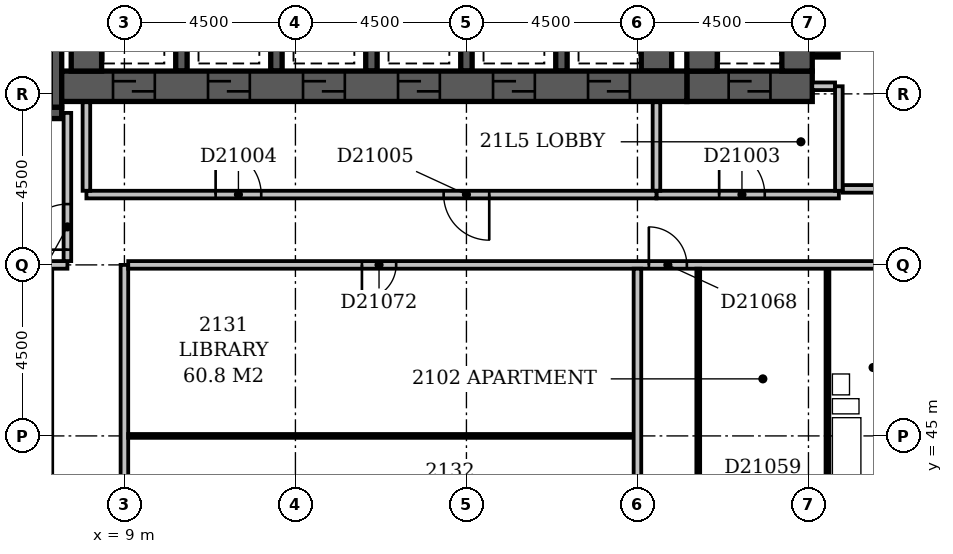
"""IFC4 building model, lengths in metres.
Left out: names, types, materials, properties, quantities, classifications, styles, units other than length and angle.
Written with IfcOpenShell. Run it as: python <this file> out.ifc"""

import sys

from ifc_helpers import new_model, si_unit, direction, frame, frame_2d, origin, place, context, subcontext, project, spatial, rectangle, extrude, element, fill, save


model = new_model("IFC4")
c1 = context("Model", 3, precision=1e-05, world=origin(), true_north=direction((0.0, 1.0)))
c2 = subcontext(c1, "Body", "Model", "MODEL_VIEW")
j1 = project(units=[si_unit("LENGTHUNIT", "METRE"), si_unit("PLANEANGLEUNIT", "RADIAN")], contexts=[c1])
p1 = place(None, origin())
s1 = spatial("IfcSite", under=j1, at=p1, CompositionType="ELEMENT")
p2 = place(p1, origin())
s2 = spatial("IfcBuilding", under=s1, at=p2, CompositionType="ELEMENT")
p3 = place(p2, frame((0.0, 0.0, 86.6)))
s3 = spatial("IfcBuildingStorey", under=s2, at=p3, CompositionType="ELEMENT", Elevation=86.6)
p4 = place(p3, frame((0.35, 53.5, -0.3), z_axis=(0.0, 0.0, 1.0), x_axis=(1.0, 0.0, 0.0)))
e1 = element("IfcWall", 1, at=p4, inside=s3, PredefinedType="SHEAR", context=c2, shape_type="SweptSolid", body=[
    extrude(rectangle(XDim=7.0, YDim=0.3, at=frame_2d((3.5, 0.0))), origin(), (0.0, 0.0, 1.0), 3.6),
])
p5 = place(p4, frame((5.58, 0.0, 0.3)))
e2 = element("IfcOpeningElement", 2, at=p5, cuts=e1, PredefinedType="OPENING", context=c2, shape_type="SweptSolid", body=[
    extrude(rectangle(XDim=1.1, YDim=2.1, at=frame_2d((0.55, 1.05))), frame((0.0, 0.162, 0.0), z_axis=(0.0, -1.0, 0.0), x_axis=(1.0, 0.0, 0.0)), (0.0, 0.0, 1.0), 0.324),
])
p6 = place(p3, frame((7.2, 53.65, -0.3), z_axis=(0.0, 0.0, 1.0), x_axis=(0.0, 1.0, 0.0)))
e3 = element("IfcWall", 3, at=p6, inside=s3, PredefinedType="SHEAR", context=c2, shape_type="SweptSolid", body=[
    extrude(rectangle(XDim=4.2, YDim=0.3, at=frame_2d((2.1, 0.0))), origin(), (0.0, 0.0, 1.0), 3.6),
])
p7 = place(p3, frame((7.35, 54.2, -0.3), z_axis=(0.0, 0.0, 1.0), x_axis=(1.0, 0.0, 0.0)))
e4 = element("IfcWall", 4, at=p7, inside=s3, PredefinedType="SHEAR", context=c2, shape_type="SweptSolid", body=[
    extrude(rectangle(XDim=16.45, YDim=0.8, at=frame_2d((8.225, 0.0))), origin(), (0.0, 0.0, 1.0), 3.6),
])
p8 = place(p7, frame((1.35, 0.0, 0.3)))
e5 = element("IfcOpeningElement", 5, at=p8, cuts=e4, PredefinedType="OPENING", context=c2, shape_type="SweptSolid", body=[
    extrude(rectangle(XDim=1.1, YDim=2.1, at=frame_2d((0.55, 1.05))), frame((0.0, 0.412, 0.0), z_axis=(0.0, -1.0, 0.0), x_axis=(1.0, 0.0, 0.0)), (0.0, 0.0, 1.0), 0.824),
])
p9 = place(p7, frame((3.85, 0.0, 0.3)))
e6 = element("IfcOpeningElement", 6, at=p9, cuts=e4, PredefinedType="OPENING", context=c2, shape_type="SweptSolid", body=[
    extrude(rectangle(XDim=1.1, YDim=2.1, at=frame_2d((0.55, 1.05))), frame((0.0, 0.412, 0.0), z_axis=(0.0, -1.0, 0.0), x_axis=(1.0, 0.0, 0.0)), (0.0, 0.0, 1.0), 0.824),
])
p10 = place(p7, frame((6.35, 0.0, 0.3)))
e7 = element("IfcOpeningElement", 7, at=p10, cuts=e4, PredefinedType="OPENING", context=c2, shape_type="SweptSolid", body=[
    extrude(rectangle(XDim=1.1, YDim=2.1, at=frame_2d((0.55, 1.05))), frame((0.0, 0.412, 0.0), z_axis=(0.0, -1.0, 0.0), x_axis=(1.0, 0.0, 0.0)), (0.0, 0.0, 1.0), 0.824),
])
p11 = place(p7, frame((8.85, 0.0, 0.3)))
e8 = element("IfcOpeningElement", 8, at=p11, cuts=e4, PredefinedType="OPENING", context=c2, shape_type="SweptSolid", body=[
    extrude(rectangle(XDim=1.1, YDim=2.1, at=frame_2d((0.55, 1.05))), frame((0.0, 0.412, 0.0), z_axis=(0.0, -1.0, 0.0), x_axis=(1.0, 0.0, 0.0)), (0.0, 0.0, 1.0), 0.824),
])
p12 = place(p7, frame((11.35, 0.0, 0.3)))
e9 = element("IfcOpeningElement", 9, at=p12, cuts=e4, PredefinedType="OPENING", context=c2, shape_type="SweptSolid", body=[
    extrude(rectangle(XDim=1.1, YDim=2.1, at=frame_2d((0.55, 1.05))), frame((0.0, 0.412, 0.0), z_axis=(0.0, -1.0, 0.0), x_axis=(1.0, 0.0, 0.0)), (0.0, 0.0, 1.0), 0.824),
])
p13 = place(p7, frame((13.85, 0.0, 0.3)))
e10 = element("IfcOpeningElement", 10, at=p13, cuts=e4, PredefinedType="OPENING", context=c2, shape_type="SweptSolid", body=[
    extrude(rectangle(XDim=1.1, YDim=2.1, at=frame_2d((0.55, 1.05))), frame((0.0, 0.412, 0.0), z_axis=(0.0, -1.0, 0.0), x_axis=(1.0, 0.0, 0.0)), (0.0, 0.0, 1.0), 0.824),
])
p14 = place(p3, frame((8.0, 54.6, -0.3), z_axis=(0.0, 0.0, 1.0), x_axis=(0.0, 1.0, 0.0)))
e11 = element("IfcWall", 11, at=p14, inside=s3, PredefinedType="SHEAR", context=c2, shape_type="SweptSolid", body=[
    extrude(rectangle(XDim=3.0, YDim=0.8, at=frame_2d((1.5, 0.0))), origin(), (0.0, 0.0, 1.0), 3.6),
])
for number, where, z_axis, x_axis in (
    (12, (10.5, 54.6, -0.3), (0.0, 0.0, 1.0), (0.0, 1.0, 0.0)),
    (13, (13.0, 54.6, -0.3), (0.0, 0.0, 1.0), (0.0, 1.0, 0.0)),
    (14, (15.5, 54.6, -0.3), (0.0, 0.0, 1.0), (0.0, 1.0, 0.0)),
    (15, (18.0, 54.6, -0.3), (0.0, 0.0, 1.0), (0.0, 1.0, 0.0)),
    (16, (20.5, 54.6, -0.3), (0.0, 0.0, 1.0), (0.0, 1.0, 0.0)),
):
    element("IfcWall", number, at=place(p3, frame(where, z_axis=z_axis, x_axis=x_axis)), inside=s3, PredefinedType="SHEAR", context=c2, shape_type="SweptSolid", body=[
        extrude(rectangle(XDim=3.0, YDim=0.3, at=frame_2d((1.5, 0.0))), origin(), (0.0, 0.0, 1.0), 3.6),
    ])
p15 = place(p3, frame((23.0, 54.6, -0.3), z_axis=(0.0, 0.0, 1.0), x_axis=(0.0, 1.0, 0.0)))
e17 = element("IfcWall", 17, at=p15, inside=s3, PredefinedType="SHEAR", context=c2, shape_type="SweptSolid", body=[
    extrude(rectangle(XDim=3.0, YDim=0.8, at=frame_2d((1.5, 0.0))), origin(), (0.0, 0.0, 1.0), 3.6),
])
p16 = place(p3, frame((23.8, 54.2, -0.3), z_axis=(0.0, 0.0, 1.0), x_axis=(1.0, 0.0, 0.0)))
e18 = element("IfcWall", 18, at=p16, inside=s3, PredefinedType="SHEAR", context=c2, shape_type="SweptSolid", body=[
    extrude(rectangle(XDim=3.3, YDim=0.8, at=frame_2d((1.65, 0.0))), origin(), (0.0, 0.0, 1.0), 3.6),
])
p17 = place(p16, frame((1.1, 0.0, 0.3)))
e19 = element("IfcOpeningElement", 19, at=p17, cuts=e18, PredefinedType="OPENING", context=c2, shape_type="SweptSolid", body=[
    extrude(rectangle(XDim=1.1, YDim=2.1, at=frame_2d((0.55, 1.05))), frame((0.0, 0.412, 0.0), z_axis=(0.0, -1.0, 0.0), x_axis=(1.0, 0.0, 0.0)), (0.0, 0.0, 1.0), 0.824),
])
for number, where, z_axis, x_axis in (
    (20, (24.2, 54.6, -0.3), (0.0, 0.0, 1.0), (0.0, 1.0, 0.0)),
    (21, (26.7, 54.6, -0.3), (0.0, 0.0, 1.0), (0.0, 1.0, 0.0)),
):
    element("IfcWall", number, at=place(p3, frame(where, z_axis=z_axis, x_axis=x_axis)), inside=s3, PredefinedType="SHEAR", context=c2, shape_type="SweptSolid", body=[
        extrude(rectangle(XDim=3.0, YDim=0.8, at=frame_2d((1.5, 0.0))), origin(), (0.0, 0.0, 1.0), 3.6),
    ])
p18 = place(p3, frame((8.0, 51.35, 0.0), z_axis=(0.0, 0.0, 1.0), x_axis=(1.0, 0.0, 0.0)))
e22 = element("IfcWall", 22, at=p18, inside=s3, PredefinedType="PARTITIONING", context=c2, shape_type="SweptSolid", body=[
    extrude(rectangle(XDim=15.0, YDim=0.2, at=frame_2d((7.5, 0.0))), origin(), (0.0, 0.0, 1.0), 3.3),
])
p19 = place(p18, frame((3.4, 0.0, 0.0)))
e23 = element("IfcOpeningElement", 23, at=p19, cuts=e22, PredefinedType="OPENING", context=c2, shape_type="SweptSolid", body=[
    extrude(rectangle(XDim=1.2, YDim=2.1, at=frame_2d((0.6, 1.05))), frame((0.0, 0.112, 0.0), z_axis=(0.0, -1.0, 0.0), x_axis=(1.0, 0.0, 0.0)), (0.0, 0.0, 1.0), 0.224),
])
p20 = place(p18, frame((9.4, 0.0, 0.0)))
e24 = element("IfcOpeningElement", 24, at=p20, cuts=e22, PredefinedType="OPENING", context=c2, shape_type="SweptSolid", body=[
    extrude(rectangle(XDim=1.2, YDim=2.1, at=frame_2d((0.6, 1.05))), frame((0.0, 0.112, 0.0), z_axis=(0.0, -1.0, 0.0), x_axis=(1.0, 0.0, 0.0)), (0.0, 0.0, 1.0), 0.224),
])
for number, where, z_axis, x_axis in (
    (25, (23.0, 51.45, 0.0), (0.0, 0.0, 1.0), (0.0, 1.0, 0.0)),
    (26, (8.0, 51.45, 0.0), (0.0, 0.0, 1.0), (0.0, 1.0, 0.0)),
):
    element("IfcWall", number, at=place(p3, frame(where, z_axis=z_axis, x_axis=x_axis)), inside=s3, PredefinedType="PARTITIONING", context=c2, shape_type="SweptSolid", body=[
        extrude(rectangle(XDim=2.33, YDim=0.2, at=frame_2d((1.165, 0.0))), origin(), (0.0, 0.0, 1.0), 3.3),
    ])
p21 = place(p3, frame((23.0, 51.35, 0.0), z_axis=(0.0, 0.0, 1.0), x_axis=(1.0, 0.0, 0.0)))
e27 = element("IfcWall", 27, at=p21, inside=s3, PredefinedType="PARTITIONING", context=c2, shape_type="SweptSolid", body=[
    extrude(rectangle(XDim=4.8, YDim=0.2, at=frame_2d((2.4, 0.0))), origin(), (0.0, 0.0, 1.0), 3.3),
])
p22 = place(p21, frame((1.65, 0.0, 0.0)))
e28 = element("IfcOpeningElement", 28, at=p22, cuts=e27, PredefinedType="OPENING", context=c2, shape_type="SweptSolid", body=[
    extrude(rectangle(XDim=1.2, YDim=2.1, at=frame_2d((0.6, 1.05))), frame((0.0, 0.112, 0.0), z_axis=(0.0, -1.0, 0.0), x_axis=(1.0, 0.0, 0.0)), (0.0, 0.0, 1.0), 0.224),
])
p23 = place(p3, frame((27.8, 51.45, 0.0), z_axis=(0.0, 0.0, 1.0), x_axis=(0.0, 1.0, 0.0)))
e29 = element("IfcWall", 29, at=p23, inside=s3, PredefinedType="PARTITIONING", context=c2, shape_type="SweptSolid", body=[
    extrude(rectangle(XDim=2.75, YDim=0.2, at=frame_2d((1.375, 0.0))), origin(), (0.0, 0.0, 1.0), 3.3),
])
p24 = place(p3, frame((27.1, 54.2, 0.0), z_axis=(0.0, 0.0, 1.0), x_axis=(1.0, 0.0, 0.0)))
e30 = element("IfcWall", 30, at=p24, inside=s3, PredefinedType="PARTITIONING", context=c2, shape_type="SweptSolid", body=[
    extrude(rectangle(XDim=0.6, YDim=0.2, at=frame_2d((0.3, 0.0))), origin(), (0.0, 0.0, 1.0), 3.3),
])
p25 = place(p3, frame((0.5, 49.5, 0.0), z_axis=(0.0, 0.0, 1.0), x_axis=(1.0, 0.0, 0.0)))
e31 = element("IfcWall", 31, at=p25, inside=s3, PredefinedType="PARTITIONING", context=c2, shape_type="SweptSolid", body=[
    extrude(rectangle(XDim=7.0, YDim=0.2, at=frame_2d((3.5, 0.0))), origin(), (0.0, 0.0, 1.0), 3.3),
])
p26 = place(p3, frame((7.5, 49.6, 0.0), z_axis=(0.0, 0.0, 1.0), x_axis=(0.0, 1.0, 0.0)))
e32 = element("IfcWall", 32, at=p26, inside=s3, PredefinedType="PARTITIONING", context=c2, shape_type="SweptSolid", body=[
    extrude(rectangle(XDim=3.9, YDim=0.2, at=frame_2d((1.95, 0.0))), origin(), (0.0, 0.0, 1.0), 3.3),
])
p27 = place(p26, frame((0.3, 0.0, 0.0)))
e33 = element("IfcOpeningElement", 33, at=p27, cuts=e32, PredefinedType="OPENING", context=c2, shape_type="SweptSolid", body=[
    extrude(rectangle(XDim=1.2, YDim=2.1, at=frame_2d((0.6, 1.05))), frame((0.0, 0.112, 0.0), z_axis=(0.0, -1.0, 0.0), x_axis=(1.0, 0.0, 0.0)), (0.0, 0.0, 1.0), 0.224),
])
p28 = place(p3, frame((9.0, 5.0, 0.0), z_axis=(0.0, 0.0, 1.0), x_axis=(0.0, 1.0, 0.0)))
e34 = element("IfcWall", 34, at=p28, inside=s3, PredefinedType="PARTITIONING", context=c2, shape_type="SweptSolid", body=[
    extrude(rectangle(XDim=44.5, YDim=0.2, at=frame_2d((22.25, 0.0))), origin(), (0.0, 0.0, 1.0), 3.3),
])
p29 = place(p28, frame((28.45, 0.0, 0.0)))
e35 = element("IfcOpeningElement", 35, at=p29, cuts=e34, PredefinedType="OPENING", context=c2, shape_type="SweptSolid", body=[
    extrude(rectangle(XDim=1.0, YDim=2.1, at=frame_2d((0.5, 1.05))), frame((0.0, 0.112, 0.0), z_axis=(0.0, -1.0, 0.0), x_axis=(1.0, 0.0, 0.0)), (0.0, 0.0, 1.0), 0.224),
])
p30 = place(p28, frame((22.8, 0.0, 0.0)))
e36 = element("IfcOpeningElement", 36, at=p30, cuts=e34, PredefinedType="OPENING", context=c2, shape_type="SweptSolid", body=[
    extrude(rectangle(XDim=1.0, YDim=2.1, at=frame_2d((0.5, 1.05))), frame((0.0, 0.112, 0.0), z_axis=(0.0, -1.0, 0.0), x_axis=(1.0, 0.0, 0.0)), (0.0, 0.0, 1.0), 0.224),
])
p31 = place(p28, frame((14.55, 0.0, 0.0)))
e37 = element("IfcOpeningElement", 37, at=p31, cuts=e34, PredefinedType="OPENING", context=c2, shape_type="SweptSolid", body=[
    extrude(rectangle(XDim=1.0, YDim=2.1, at=frame_2d((0.5, 1.05))), frame((0.0, 0.112, 0.0), z_axis=(0.0, -1.0, 0.0), x_axis=(1.0, 0.0, 0.0)), (0.0, 0.0, 1.0), 0.224),
])
p32 = place(p28, frame((9.3, 0.0, 0.0)))
e38 = element("IfcOpeningElement", 38, at=p32, cuts=e34, PredefinedType="OPENING", context=c2, shape_type="SweptSolid", body=[
    extrude(rectangle(XDim=1.0, YDim=2.1, at=frame_2d((0.5, 1.05))), frame((0.0, 0.112, 0.0), z_axis=(0.0, -1.0, 0.0), x_axis=(1.0, 0.0, 0.0)), (0.0, 0.0, 1.0), 0.224),
])
p33 = place(p28, frame((35.0, 0.0, 0.0)))
e39 = element("IfcOpeningElement", 39, at=p33, cuts=e34, PredefinedType="OPENING", context=c2, shape_type="SweptSolid", body=[
    extrude(rectangle(XDim=0.9, YDim=2.1, at=frame_2d((0.45, 1.05))), frame((0.0, 0.112, 0.0), z_axis=(0.0, -1.0, 0.0), x_axis=(1.0, 0.0, 0.0)), (0.0, 0.0, 1.0), 0.224),
])
p34 = place(p28, frame((1.5, 0.0, 0.0)))
e40 = element("IfcOpeningElement", 40, at=p34, cuts=e34, PredefinedType="OPENING", context=c2, shape_type="SweptSolid", body=[
    extrude(rectangle(XDim=0.9, YDim=2.1, at=frame_2d((0.45, 1.05))), frame((0.0, 0.112, 0.0), z_axis=(0.0, -1.0, 0.0), x_axis=(1.0, 0.0, 0.0)), (0.0, 0.0, 1.0), 0.224),
])
p35 = place(p3, frame((22.5, 36.6, 0.0), z_axis=(0.0, 0.0, 1.0), x_axis=(0.0, 1.0, 0.0)))
e41 = element("IfcWall", 41, at=p35, inside=s3, PredefinedType="PARTITIONING", context=c2, shape_type="SweptSolid", body=[
    extrude(rectangle(XDim=12.8, YDim=0.2, at=frame_2d((6.4, 0.0))), origin(), (0.0, 0.0, 1.0), 3.3),
])
p36 = place(p3, frame((24.1, 43.15, 0.0), z_axis=(0.0, 0.0, 1.0), x_axis=(0.0, 1.0, 0.0)))
e42 = element("IfcWall", 42, at=p36, inside=s3, PredefinedType="PARTITIONING", context=c2, shape_type="SweptSolid", body=[
    extrude(rectangle(XDim=6.25, YDim=0.1, at=frame_2d((3.125, 0.0))), origin(), (0.0, 0.0, 1.0), 3.3),
])
p37 = place(p3, frame((27.5, 43.2, 0.0), z_axis=(0.0, 0.0, 1.0), x_axis=(0.0, 1.0, 0.0)))
e43 = element("IfcWall", 43, at=p37, inside=s3, PredefinedType="PLUMBINGWALL", context=c2, shape_type="SweptSolid", body=[
    extrude(rectangle(XDim=6.2, YDim=0.1, at=frame_2d((3.1, 0.0))), origin(), (0.0, 0.0, 1.0), 2.6),
])
p38 = place(p3, frame((9.1, 45.0, 0.0), z_axis=(0.0, 0.0, 1.0), x_axis=(1.0, 0.0, 0.0)))
e44 = element("IfcWall", 44, at=p38, inside=s3, PredefinedType="PARTITIONING", context=c2, shape_type="SweptSolid", body=[
    extrude(rectangle(XDim=13.3, YDim=0.1, at=frame_2d((6.65, 0.0))), origin(), (0.0, 0.0, 1.0), 3.3),
])
p39 = place(p3, frame((9.1, 49.5, 0.0), z_axis=(0.0, 0.0, 1.0), x_axis=(1.0, 0.0, 0.0)))
e45 = element("IfcWall", 45, at=p39, inside=s3, PredefinedType="PARTITIONING", context=c2, shape_type="SweptSolid", body=[
    extrude(rectangle(XDim=57.8, YDim=0.2, at=frame_2d((28.9, 0.0))), origin(), (0.0, 0.0, 1.0), 3.3),
])
p40 = place(p39, frame((13.7, 0.0, 0.0)))
e46 = element("IfcOpeningElement", 46, at=p40, cuts=e45, PredefinedType="OPENING", context=c2, shape_type="SweptSolid", body=[
    extrude(rectangle(XDim=1.0, YDim=2.1, at=frame_2d((0.5, 1.05))), frame((0.0, 0.112, 0.0), z_axis=(0.0, -1.0, 0.0), x_axis=(1.0, 0.0, 0.0)), (0.0, 0.0, 1.0), 0.224),
])
p41 = place(p39, frame((22.7, 0.0, 0.0)))
e47 = element("IfcOpeningElement", 47, at=p41, cuts=e45, PredefinedType="OPENING", context=c2, shape_type="SweptSolid", body=[
    extrude(rectangle(XDim=1.0, YDim=2.1, at=frame_2d((0.5, 1.05))), frame((0.0, 0.112, 0.0), z_axis=(0.0, -1.0, 0.0), x_axis=(1.0, 0.0, 0.0)), (0.0, 0.0, 1.0), 0.224),
])
p42 = place(p39, frame((38.6, 0.0, 0.0)))
e48 = element("IfcOpeningElement", 48, at=p42, cuts=e45, PredefinedType="OPENING", context=c2, shape_type="SweptSolid", body=[
    extrude(rectangle(XDim=1.0, YDim=2.1, at=frame_2d((0.5, 1.05))), frame((0.0, 0.112, 0.0), z_axis=(0.0, -1.0, 0.0), x_axis=(1.0, 0.0, 0.0)), (0.0, 0.0, 1.0), 0.224),
])
p43 = place(p39, frame((55.45, 0.0, 0.0)))
e49 = element("IfcOpeningElement", 49, at=p43, cuts=e45, PredefinedType="OPENING", context=c2, shape_type="SweptSolid", body=[
    extrude(rectangle(XDim=1.0, YDim=2.1, at=frame_2d((0.5, 1.05))), frame((0.0, 0.112, 0.0), z_axis=(0.0, -1.0, 0.0), x_axis=(1.0, 0.0, 0.0)), (0.0, 0.0, 1.0), 0.224),
])
p44 = place(p39, frame((6.15, 0.0, 0.0)))
e50 = element("IfcOpeningElement", 50, at=p44, cuts=e45, PredefinedType="OPENING", context=c2, shape_type="SweptSolid", body=[
    extrude(rectangle(XDim=0.9, YDim=2.1, at=frame_2d((0.45, 1.05))), frame((0.0, 0.112, 0.0), z_axis=(0.0, -1.0, 0.0), x_axis=(1.0, 0.0, 0.0)), (0.0, 0.0, 1.0), 0.224),
])
p45 = place(p3, frame((27.9, 51.5, 0.0), z_axis=(0.0, 0.0, 1.0), x_axis=(1.0, 0.0, 0.0)))
e51 = element("IfcWall", 51, at=p45, inside=s3, PredefinedType="PARTITIONING", context=c2, shape_type="SweptSolid", body=[
    extrude(rectangle(XDim=9.3, YDim=0.2, at=frame_2d((4.65, 0.0))), origin(), (0.0, 0.0, 1.0), 3.3),
])
p46 = place(p45, frame((4.2, 0.0, 0.0)))
e52 = element("IfcOpeningElement", 52, at=p46, cuts=e51, PredefinedType="OPENING", context=c2, shape_type="SweptSolid", body=[
    extrude(rectangle(XDim=0.9, YDim=2.1, at=frame_2d((0.45, 1.05))), frame((0.0, 0.112, 0.0), z_axis=(0.0, -1.0, 0.0), x_axis=(1.0, 0.0, 0.0)), (0.0, 0.0, 1.0), 0.224),
])
p47 = place(p3, frame((27.1, 55.0, 0.0), z_axis=(0.0, 0.0, 1.0), x_axis=(1.0, 0.0, 0.0)))
e53 = element("IfcWall", 53, at=p47, inside=s3, PredefinedType="PARTITIONING", context=c2, shape_type="SweptSolid", body=[
    extrude(rectangle(XDim=0.7, YDim=0.1, at=frame_2d((0.35, 0.0))), origin(), (0.0, 0.0, 1.0), 3.3),
])
p48 = place(p27, origin())
e54 = element("IfcDoor", 54, at=p48, inside=s3, OperationType="SINGLE_SWING_LEFT", PredefinedType="DOOR", context=c2, shape_type="SweptSolid", body=[
    extrude(rectangle(XDim=1.2, YDim=2.1, at=frame_2d((0.6, 1.05))), frame((0.0, 0.025, 0.0), z_axis=(0.0, -1.0, 0.0), x_axis=(1.0, 0.0, 0.0)), (0.0, 0.0, 1.0), 0.05),
])
fill(e33, e54)
p49 = place(p22, origin())
e55 = element("IfcDoor", 55, at=p49, inside=s3, OperationType="SINGLE_SWING_LEFT", PredefinedType="DOOR", context=c2, shape_type="SweptSolid", body=[
    extrude(rectangle(XDim=1.2, YDim=2.1, at=frame_2d((0.6, 1.05))), frame((0.0, 0.025, 0.0), z_axis=(0.0, -1.0, 0.0), x_axis=(1.0, 0.0, 0.0)), (0.0, 0.0, 1.0), 0.05),
])
fill(e28, e55)
p50 = place(p17, origin())
e56 = element("IfcDoor", 56, at=p50, inside=s3, OperationType="SLIDING_TO_LEFT", PredefinedType="DOOR", context=c2, shape_type="SweptSolid", body=[
    extrude(rectangle(XDim=1.1, YDim=2.1, at=frame_2d((0.55, 1.05))), frame((0.0, 0.025, 0.0), z_axis=(0.0, -1.0, 0.0), x_axis=(1.0, 0.0, 0.0)), (0.0, 0.0, 1.0), 0.05),
])
fill(e19, e56)
p51 = place(p8, origin())
e57 = element("IfcDoor", 57, at=p51, inside=s3, OperationType="SLIDING_TO_LEFT", PredefinedType="DOOR", context=c2, shape_type="SweptSolid", body=[
    extrude(rectangle(XDim=1.1, YDim=2.1, at=frame_2d((0.55, 1.05))), frame((0.0, 0.025, 0.0), z_axis=(0.0, -1.0, 0.0), x_axis=(1.0, 0.0, 0.0)), (0.0, 0.0, 1.0), 0.05),
])
fill(e5, e57)
p52 = place(p9, origin())
e58 = element("IfcDoor", 58, at=p52, inside=s3, OperationType="SLIDING_TO_LEFT", PredefinedType="DOOR", context=c2, shape_type="SweptSolid", body=[
    extrude(rectangle(XDim=1.1, YDim=2.1, at=frame_2d((0.55, 1.05))), frame((0.0, 0.025, 0.0), z_axis=(0.0, -1.0, 0.0), x_axis=(1.0, 0.0, 0.0)), (0.0, 0.0, 1.0), 0.05),
])
fill(e6, e58)
p53 = place(p10, origin())
e59 = element("IfcDoor", 59, at=p53, inside=s3, OperationType="SLIDING_TO_LEFT", PredefinedType="DOOR", context=c2, shape_type="SweptSolid", body=[
    extrude(rectangle(XDim=1.1, YDim=2.1, at=frame_2d((0.55, 1.05))), frame((0.0, 0.025, 0.0), z_axis=(0.0, -1.0, 0.0), x_axis=(1.0, 0.0, 0.0)), (0.0, 0.0, 1.0), 0.05),
])
fill(e7, e59)
p54 = place(p11, origin())
e60 = element("IfcDoor", 60, at=p54, inside=s3, OperationType="SLIDING_TO_LEFT", PredefinedType="DOOR", context=c2, shape_type="SweptSolid", body=[
    extrude(rectangle(XDim=1.1, YDim=2.1, at=frame_2d((0.55, 1.05))), frame((0.0, 0.025, 0.0), z_axis=(0.0, -1.0, 0.0), x_axis=(1.0, 0.0, 0.0)), (0.0, 0.0, 1.0), 0.05),
])
fill(e8, e60)
p55 = place(p12, origin())
e61 = element("IfcDoor", 61, at=p55, inside=s3, OperationType="SLIDING_TO_LEFT", PredefinedType="DOOR", context=c2, shape_type="SweptSolid", body=[
    extrude(rectangle(XDim=1.1, YDim=2.1, at=frame_2d((0.55, 1.05))), frame((0.0, 0.025, 0.0), z_axis=(0.0, -1.0, 0.0), x_axis=(1.0, 0.0, 0.0)), (0.0, 0.0, 1.0), 0.05),
])
fill(e9, e61)
p56 = place(p13, origin())
e62 = element("IfcDoor", 62, at=p56, inside=s3, OperationType="SLIDING_TO_LEFT", PredefinedType="DOOR", context=c2, shape_type="SweptSolid", body=[
    extrude(rectangle(XDim=1.1, YDim=2.1, at=frame_2d((0.55, 1.05))), frame((0.0, 0.025, 0.0), z_axis=(0.0, -1.0, 0.0), x_axis=(1.0, 0.0, 0.0)), (0.0, 0.0, 1.0), 0.05),
])
fill(e10, e62)
p57 = place(p19, origin())
e63 = element("IfcDoor", 63, at=p57, inside=s3, OperationType="SINGLE_SWING_LEFT", PredefinedType="DOOR", context=c2, shape_type="SweptSolid", body=[
    extrude(rectangle(XDim=1.2, YDim=2.1, at=frame_2d((0.6, 1.05))), frame((0.0, 0.025, 0.0), z_axis=(0.0, -1.0, 0.0), x_axis=(1.0, 0.0, 0.0)), (0.0, 0.0, 1.0), 0.05),
])
fill(e23, e63)
p58 = place(p20, origin())
e64 = element("IfcDoor", 64, at=p58, inside=s3, OperationType="SINGLE_SWING_RIGHT", PredefinedType="DOOR", context=c2, shape_type="SweptSolid", body=[
    extrude(rectangle(XDim=1.2, YDim=2.1, at=frame_2d((0.6, 1.05))), frame((0.0, 0.025, 0.0), z_axis=(0.0, -1.0, 0.0), x_axis=(1.0, 0.0, 0.0)), (0.0, 0.0, 1.0), 0.05),
])
fill(e24, e64)
p59 = place(p40, origin())
e65 = element("IfcDoor", 65, at=p59, inside=s3, OperationType="SINGLE_SWING_LEFT", PredefinedType="DOOR", context=c2, shape_type="SweptSolid", body=[
    extrude(rectangle(XDim=1.0, YDim=2.1, at=frame_2d((0.5, 1.05))), frame((0.0, 0.025, 0.0), z_axis=(0.0, -1.0, 0.0), x_axis=(1.0, 0.0, 0.0)), (0.0, 0.0, 1.0), 0.05),
])
fill(e46, e65)
p60 = place(p44, frame((0.9, 0.0, 0.0), z_axis=(0.0, 0.0, 1.0), x_axis=(-1.0, 0.0, 0.0)))
e66 = element("IfcDoor", 66, at=p60, inside=s3, OperationType="SINGLE_SWING_RIGHT", PredefinedType="DOOR", context=c2, shape_type="SweptSolid", body=[
    extrude(rectangle(XDim=0.9, YDim=2.1, at=frame_2d((0.45, 1.05))), frame((0.0, 0.025, 0.0), z_axis=(0.0, -1.0, 0.0), x_axis=(1.0, 0.0, 0.0)), (0.0, 0.0, 1.0), 0.05),
])
fill(e50, e66)
save(model, sys.argv[1])
